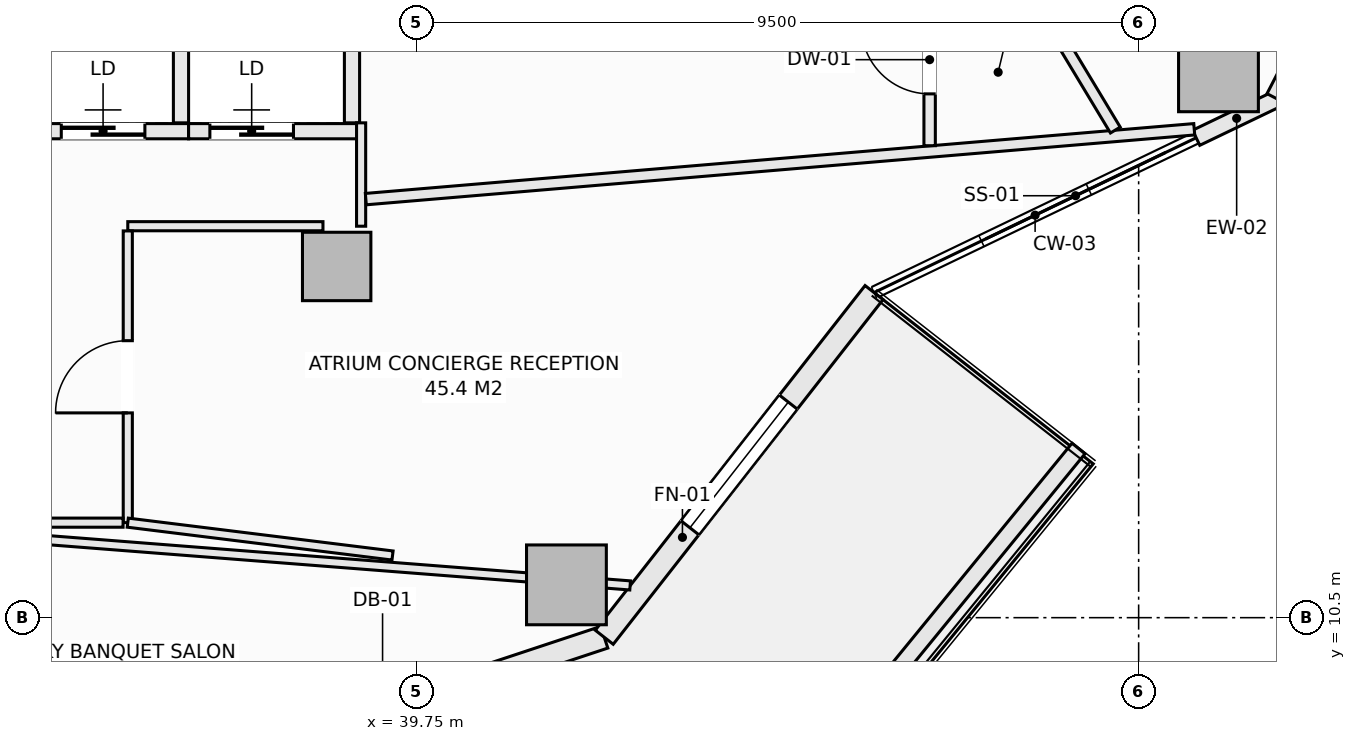
"""IFC4 building model, lengths in metres.
Left out: names, types, materials, properties, quantities, classifications, styles, units other than length and angle.
Written with IfcOpenShell. Run it as: python <this file> out.ifc"""

import sys

from ifc_helpers import new_model, si_unit, direction, frame, frame_2d, origin, origin_2d, place, context, subcontext, project, spatial, rectangle, extrude, element, fill, save


model = new_model("IFC4")
c1 = context("Model", 3, precision=1e-05, world=origin(), true_north=direction((0.0, 1.0)))
c2 = subcontext(c1, "Body", "Model", "MODEL_VIEW")
j1 = project(units=[si_unit("LENGTHUNIT", "METRE"), si_unit("PLANEANGLEUNIT", "RADIAN")], contexts=[c1])
p1 = place(None, origin())
s1 = spatial("IfcSite", under=j1, at=p1, CompositionType="ELEMENT")
p2 = place(p1, origin())
s2 = spatial("IfcBuilding", under=s1, at=p2, CompositionType="ELEMENT")
p3 = place(p2, frame((0.0, 0.0, 135.9)))
s3 = spatial("IfcBuildingStorey", under=s2, at=p3, CompositionType="ELEMENT", Elevation=135.9)
for number, where, z_axis, x_axis in (
    (1, (41.721, 10.932, -0.27), (0.0, 0.0, 1.0), (1.0, 0.0, 0.0)),
    (2, (50.3, 17.681, -0.27), (0.0, 0.0, 1.0), (1.0, 0.0, 0.0)),
):
    element("IfcColumn", number, at=place(p3, frame(where, z_axis=z_axis, x_axis=x_axis)), inside=s3, PredefinedType="COLUMN", context=c2, shape_type="SweptSolid", body=[
        extrude(rectangle(XDim=1.05, YDim=1.05, at=origin_2d()), origin(), (0.0, 0.0, 1.0), 3.4),
    ])
p4 = place(p3, frame((38.698, 15.121, -0.27), z_axis=(0.0, 0.0, 1.0), x_axis=(1.0, 0.0, 0.0)))
e3 = element("IfcColumn", 3, at=p4, inside=s3, PredefinedType="COLUMN", context=c2, shape_type="SweptSolid", body=[
    extrude(rectangle(XDim=0.9, YDim=0.9, at=origin_2d()), origin(), (0.0, 0.0, 1.0), 3.4),
])
p5 = place(p3, frame((36.385, 8.309, 0.0), z_axis=(0.0, 0.0, 1.0), x_axis=(0.949238009374, 0.314558741032, 0.0)))
e4 = element("IfcWall", 4, at=p5, inside=s3, PredefinedType="SOLIDWALL", context=c2, shape_type="SweptSolid", body=[
    extrude(rectangle(XDim=6.146, YDim=0.3, at=frame_2d((3.073, 0.0))), origin(), (0.0, 0.0, 1.0), 2.653),
])
p6 = place(p5, frame((2.173, 0.0, 0.0)))
e5 = element("IfcOpeningElement", 5, at=p6, cuts=e4, PredefinedType="OPENING", context=c2, shape_type="SweptSolid", body=[
    extrude(rectangle(XDim=1.8, YDim=2.25, at=frame_2d((0.9, 1.125))), frame((0.0, 0.16, 0.0), z_axis=(0.0, -1.0, 0.0), x_axis=(1.0, 0.0, 0.0)), (0.0, 0.0, 1.0), 0.32),
])
p7 = place(p3, frame((42.219, 10.242, 0.0), z_axis=(0.0, 0.0, 1.0), x_axis=(0.616435134162, 0.787405693001, 0.0)))
e6 = element("IfcWall", 6, at=p7, inside=s3, PredefinedType="SOLIDWALL", context=c2, shape_type="SweptSolid", body=[
    extrude(rectangle(XDim=5.759, YDim=0.3, at=frame_2d((2.879, 0.0))), origin(), (0.0, 0.0, 1.0), 2.653),
])
p8 = place(p7, frame((1.829, 0.0, 0.74)))
e7 = element("IfcOpeningElement", 7, at=p8, cuts=e6, PredefinedType="OPENING", context=c2, shape_type="SweptSolid", body=[
    extrude(rectangle(XDim=2.1, YDim=1.7, at=frame_2d((1.05, 0.85))), frame((0.0, 0.16, 0.0), z_axis=(0.0, -1.0, 0.0), x_axis=(1.0, 0.0, 0.0)), (0.0, 0.0, 1.0), 0.32),
])
p9 = place(p3, frame((50.007, 16.813, 0.0), z_axis=(0.0, 0.0, 1.0), x_axis=(0.90138115854, 0.433026566193, 0.0)))
e8 = element("IfcWall", 8, at=p9, inside=s3, PredefinedType="SOLIDWALL", context=c2, shape_type="SweptSolid", body=[
    extrude(rectangle(XDim=1.182, YDim=0.22, at=frame_2d((0.591, 0.0))), origin(), (0.0, 0.0, 1.0), 2.653),
])
p10 = place(p3, frame((51.072, 17.325, 0.0), z_axis=(0.0, 0.0, 1.0), x_axis=(0.459767899643, 0.888039119892, 0.0)))
e9 = element("IfcWall", 9, at=p10, inside=s3, PredefinedType="SOLIDWALL", context=c2, shape_type="SweptSolid", body=[
    extrude(rectangle(XDim=5.255, YDim=0.3, at=frame_2d((2.628, 0.0))), origin(), (0.0, 0.0, 1.0), 2.653),
])
p11 = place(p10, frame((0.65, 0.0, 0.74)))
e10 = element("IfcOpeningElement", 10, at=p11, cuts=e9, PredefinedType="OPENING", context=c2, shape_type="SweptSolid", body=[
    extrude(rectangle(XDim=2.1, YDim=1.7, at=frame_2d((1.05, 0.85))), frame((0.0, 0.16, 0.0), z_axis=(0.0, -1.0, 0.0), x_axis=(1.0, 0.0, 0.0)), (0.0, 0.0, 1.0), 0.32),
])
p12 = place(p3, frame((44.167, 7.477, 0.0), z_axis=(0.0, 0.0, 1.0), x_axis=(0.633002467947, 0.77414977593, 0.0)))
e11 = element("IfcWall", 11, at=p12, inside=s3, PredefinedType="PARAPET", context=c2, shape_type="SweptSolid", body=[
    extrude(rectangle(XDim=6.78, YDim=0.22, at=frame_2d((3.39, 0.0))), origin(), (0.0, 0.0, 1.0), 0.52),
])
p13 = place(p3, frame((34.5, 16.9, 0.0), z_axis=(0.0, 0.0, 1.0), x_axis=(1.0, 0.0, 0.0)))
e12 = element("IfcWall", 12, at=p13, inside=s3, PredefinedType="SOLIDWALL", context=c2, shape_type="SweptSolid", body=[
    extrude(rectangle(XDim=2.25, YDim=0.2, at=frame_2d((1.125, 0.0))), origin(), (0.0, 0.0, 1.0), 3.13),
])
p14 = place(p13, frame((0.575, 0.0, 0.0)))
e13 = element("IfcOpeningElement", 13, at=p14, cuts=e12, PredefinedType="OPENING", context=c2, shape_type="SweptSolid", body=[
    extrude(rectangle(XDim=1.1, YDim=2.2, at=frame_2d((0.55, 1.1))), frame((0.0, 0.11, 0.0), z_axis=(0.0, -1.0, 0.0), x_axis=(1.0, 0.0, 0.0)), (0.0, 0.0, 1.0), 0.22),
])
p15 = place(p3, frame((36.65, 17.01, 0.0), z_axis=(0.0, 0.0, 1.0), x_axis=(0.0, 1.0, 0.0)))
e14 = element("IfcWall", 14, at=p15, inside=s3, PredefinedType="SOLIDWALL", context=c2, shape_type="SweptSolid", body=[
    extrude(rectangle(XDim=2.43, YDim=0.2, at=frame_2d((1.215, 0.0))), origin(), (0.0, 0.0, 1.0), 3.13),
])
p16 = place(p3, frame((36.75, 16.9, 0.0), z_axis=(0.0, 0.0, 1.0), x_axis=(1.0, 0.0, 0.0)))
e15 = element("IfcWall", 15, at=p16, inside=s3, PredefinedType="SOLIDWALL", context=c2, shape_type="SweptSolid", body=[
    extrude(rectangle(XDim=2.25, YDim=0.2, at=frame_2d((1.125, 0.0))), origin(), (0.0, 0.0, 1.0), 3.13),
])
p17 = place(p16, frame((0.28, 0.0, 0.0)))
e16 = element("IfcOpeningElement", 16, at=p17, cuts=e15, PredefinedType="OPENING", context=c2, shape_type="SweptSolid", body=[
    extrude(rectangle(XDim=1.1, YDim=2.2, at=frame_2d((0.55, 1.1))), frame((0.0, 0.11, 0.0), z_axis=(0.0, -1.0, 0.0), x_axis=(1.0, 0.0, 0.0)), (0.0, 0.0, 1.0), 0.22),
])
p18 = place(p3, frame((38.9, 17.01, 0.0), z_axis=(0.0, 0.0, 1.0), x_axis=(0.0, 1.0, 0.0)))
e17 = element("IfcWall", 17, at=p18, inside=s3, PredefinedType="SOLIDWALL", context=c2, shape_type="SweptSolid", body=[
    extrude(rectangle(XDim=2.43, YDim=0.2, at=frame_2d((1.215, 0.0))), origin(), (0.0, 0.0, 1.0), 3.13),
])
p19 = place(p3, frame((39.02, 15.65, 0.0), z_axis=(0.0, 0.0, 1.0), x_axis=(0.0, 1.0, 0.0)))
e18 = element("IfcWall", 18, at=p19, inside=s3, PredefinedType="PARTITIONING", context=c2, shape_type="SweptSolid", body=[
    extrude(rectangle(XDim=1.36, YDim=0.12, at=frame_2d((0.68, 0.0))), origin(), (0.0, 0.0, 1.0), 2.505),
])
p20 = place(p3, frame((35.95, 15.65, 0.0), z_axis=(0.0, 0.0, 1.0), x_axis=(1.0, 0.0, 0.0)))
e19 = element("IfcWall", 19, at=p20, inside=s3, PredefinedType="PARTITIONING", context=c2, shape_type="SweptSolid", body=[
    extrude(rectangle(XDim=2.568, YDim=0.12, at=frame_2d((1.284, 0.0))), origin(), (0.0, 0.0, 1.0), 3.13),
])
p21 = place(p3, frame((35.95, 11.75, 0.0), z_axis=(0.0, 0.0, 1.0), x_axis=(0.0, 1.0, 0.0)))
e20 = element("IfcWall", 20, at=p21, inside=s3, PredefinedType="PARTITIONING", context=c2, shape_type="SweptSolid", body=[
    extrude(rectangle(XDim=3.838, YDim=0.12, at=frame_2d((1.919, 0.0))), origin(), (0.0, 0.0, 1.0), 3.13),
])
p22 = place(p21, frame((1.444, 0.0, 0.0)))
e21 = element("IfcOpeningElement", 21, at=p22, cuts=e20, PredefinedType="OPENING", context=c2, shape_type="SweptSolid", body=[
    extrude(rectangle(XDim=0.95, YDim=2.1, at=frame_2d((0.475, 1.05))), frame((0.0, 0.07, 0.0), z_axis=(0.0, -1.0, 0.0), x_axis=(1.0, 0.0, 0.0)), (0.0, 0.0, 1.0), 0.14),
])
p23 = place(p3, frame((27.212, 11.75, 0.0), z_axis=(0.0, 0.0, 1.0), x_axis=(1.0, 0.0, 0.0)))
e22 = element("IfcWall", 22, at=p23, inside=s3, PredefinedType="PARTITIONING", context=c2, shape_type="SweptSolid", body=[
    extrude(rectangle(XDim=8.676, YDim=0.12, at=frame_2d((4.338, 0.0))), origin(), (0.0, 0.0, 1.0), 3.13),
])
p24 = place(p23, frame((1.105, 0.0, 0.0)))
e23 = element("IfcOpeningElement", 23, at=p24, cuts=e22, PredefinedType="OPENING", context=c2, shape_type="SweptSolid", body=[
    extrude(rectangle(XDim=0.95, YDim=2.1, at=frame_2d((0.475, 1.05))), frame((0.0, 0.07, 0.0), z_axis=(0.0, -1.0, 0.0), x_axis=(1.0, 0.0, 0.0)), (0.0, 0.0, 1.0), 0.14),
])
p25 = place(p23, frame((4.698, 0.0, 0.0)))
e24 = element("IfcOpeningElement", 24, at=p25, cuts=e22, PredefinedType="OPENING", context=c2, shape_type="SweptSolid", body=[
    extrude(rectangle(XDim=0.95, YDim=2.1, at=frame_2d((0.475, 1.05))), frame((0.0, 0.07, 0.0), z_axis=(0.0, -1.0, 0.0), x_axis=(1.0, 0.0, 0.0)), (0.0, 0.0, 1.0), 0.14),
])
p26 = place(p3, frame((39.082, 16.007, 0.0), z_axis=(0.0, 0.0, 1.0), x_axis=(0.996466495788, 0.083991206515, 0.0)))
e25 = element("IfcWall", 25, at=p26, inside=s3, PredefinedType="PARTITIONING", context=c2, shape_type="SweptSolid", body=[
    extrude(rectangle(XDim=10.938, YDim=0.15, at=frame_2d((5.469, 0.0))), origin(), (0.0, 0.0, 1.0), 2.653),
])
p27 = place(p3, frame((33.872, 11.6, 0.0), z_axis=(0.0, 0.0, 1.0), x_axis=(0.996986194661, -0.077579170241, 0.0)))
e26 = element("IfcWall", 26, at=p27, inside=s3, PredefinedType="PARTITIONING", context=c2, shape_type="SweptSolid", body=[
    extrude(rectangle(XDim=8.714, YDim=0.12, at=frame_2d((4.357, 0.0))), origin(), (0.0, 0.0, 1.0), 2.653),
])
p28 = place(p3, frame((35.95, 11.75, 0.0), z_axis=(0.0, 0.0, 1.0), x_axis=(0.992393012253, -0.123110150805, 0.0)))
e27 = element("IfcWall", 27, at=p28, inside=s3, PredefinedType="PARTITIONING", context=c2, shape_type="SweptSolid", body=[
    extrude(rectangle(XDim=3.51, YDim=0.12, at=frame_2d((1.755, 0.0))), origin(), (0.0, 0.0, 1.0), 3.13),
])
p29 = place(p3, frame((38.892, 33.597, 0.0), z_axis=(0.0, 0.0, 1.0), x_axis=(0.516074687683, -0.856543587176, 0.0)))
e28 = element("IfcWall", 28, at=p29, inside=s3, PredefinedType="PARTITIONING", context=c2, shape_type="SweptSolid", body=[
    extrude(rectangle(XDim=19.476, YDim=0.15, at=frame_2d((9.738, 0.0))), origin(), (0.0, 0.0, 1.0), 2.505),
])
p30 = place(p3, frame((46.5, 16.709, 0.0), z_axis=(0.0, 0.0, 1.0), x_axis=(0.0, 1.0, 0.0)))
e29 = element("IfcWall", 29, at=p30, inside=s3, PredefinedType="PARTITIONING", context=c2, shape_type="SweptSolid", body=[
    extrude(rectangle(XDim=2.264, YDim=0.15, at=frame_2d((1.132, 0.0))), origin(), (0.0, 0.0, 1.0), 3.13),
])
p31 = place(p30, frame((0.682, 0.0, 0.0)))
e30 = element("IfcOpeningElement", 30, at=p31, cuts=e29, PredefinedType="OPENING", context=c2, shape_type="SweptSolid", body=[
    extrude(rectangle(XDim=0.9, YDim=2.1, at=frame_2d((0.45, 1.05))), frame((0.0, 0.085, 0.0), z_axis=(0.0, -1.0, 0.0), x_axis=(1.0, 0.0, 0.0)), (0.0, 0.0, 1.0), 0.17),
])
p32 = place(p8, origin())
e31 = element("IfcWindow", 31, at=p32, inside=s3, PartitioningType="SINGLE_PANEL", PredefinedType="WINDOW", context=c2, shape_type="SweptSolid", body=[
    extrude(rectangle(XDim=2.1, YDim=1.7, at=frame_2d((1.05, 0.85))), frame((0.0, 0.03, 0.0), z_axis=(0.0, -1.0, 0.0), x_axis=(1.0, 0.0, 0.0)), (0.0, 0.0, 1.0), 0.06),
])
fill(e7, e31)
p33 = place(p14, origin())
e32 = element("IfcDoor", 32, at=p33, inside=s3, OperationType="SLIDING_TO_LEFT", PredefinedType="DOOR", context=c2, shape_type="SweptSolid", body=[
    extrude(rectangle(XDim=1.1, YDim=2.2, at=frame_2d((0.55, 1.1))), frame((0.0, 0.025, 0.0), z_axis=(0.0, -1.0, 0.0), x_axis=(1.0, 0.0, 0.0)), (0.0, 0.0, 1.0), 0.05),
])
fill(e13, e32)
p34 = place(p17, origin())
e33 = element("IfcDoor", 33, at=p34, inside=s3, OperationType="SLIDING_TO_LEFT", PredefinedType="DOOR", context=c2, shape_type="SweptSolid", body=[
    extrude(rectangle(XDim=1.1, YDim=2.2, at=frame_2d((0.55, 1.1))), frame((0.0, 0.025, 0.0), z_axis=(0.0, -1.0, 0.0), x_axis=(1.0, 0.0, 0.0)), (0.0, 0.0, 1.0), 0.05),
])
fill(e16, e33)
p35 = place(p22, origin())
e34 = element("IfcDoor", 34, at=p35, inside=s3, OperationType="SINGLE_SWING_LEFT", PredefinedType="DOOR", context=c2, shape_type="SweptSolid", body=[
    extrude(rectangle(XDim=0.95, YDim=2.1, at=frame_2d((0.475, 1.05))), frame((0.0, 0.025, 0.0), z_axis=(0.0, -1.0, 0.0), x_axis=(1.0, 0.0, 0.0)), (0.0, 0.0, 1.0), 0.05),
])
fill(e21, e34)
p36 = place(p31, origin())
e35 = element("IfcDoor", 35, at=p36, inside=s3, OperationType="SINGLE_SWING_RIGHT", PredefinedType="DOOR", context=c2, shape_type="SweptSolid", body=[
    extrude(rectangle(XDim=0.9, YDim=2.1, at=frame_2d((0.45, 1.05))), frame((0.0, 0.025, 0.0), z_axis=(0.0, -1.0, 0.0), x_axis=(1.0, 0.0, 0.0)), (0.0, 0.0, 1.0), 0.05),
])
fill(e30, e35)
save(model, sys.argv[1])
